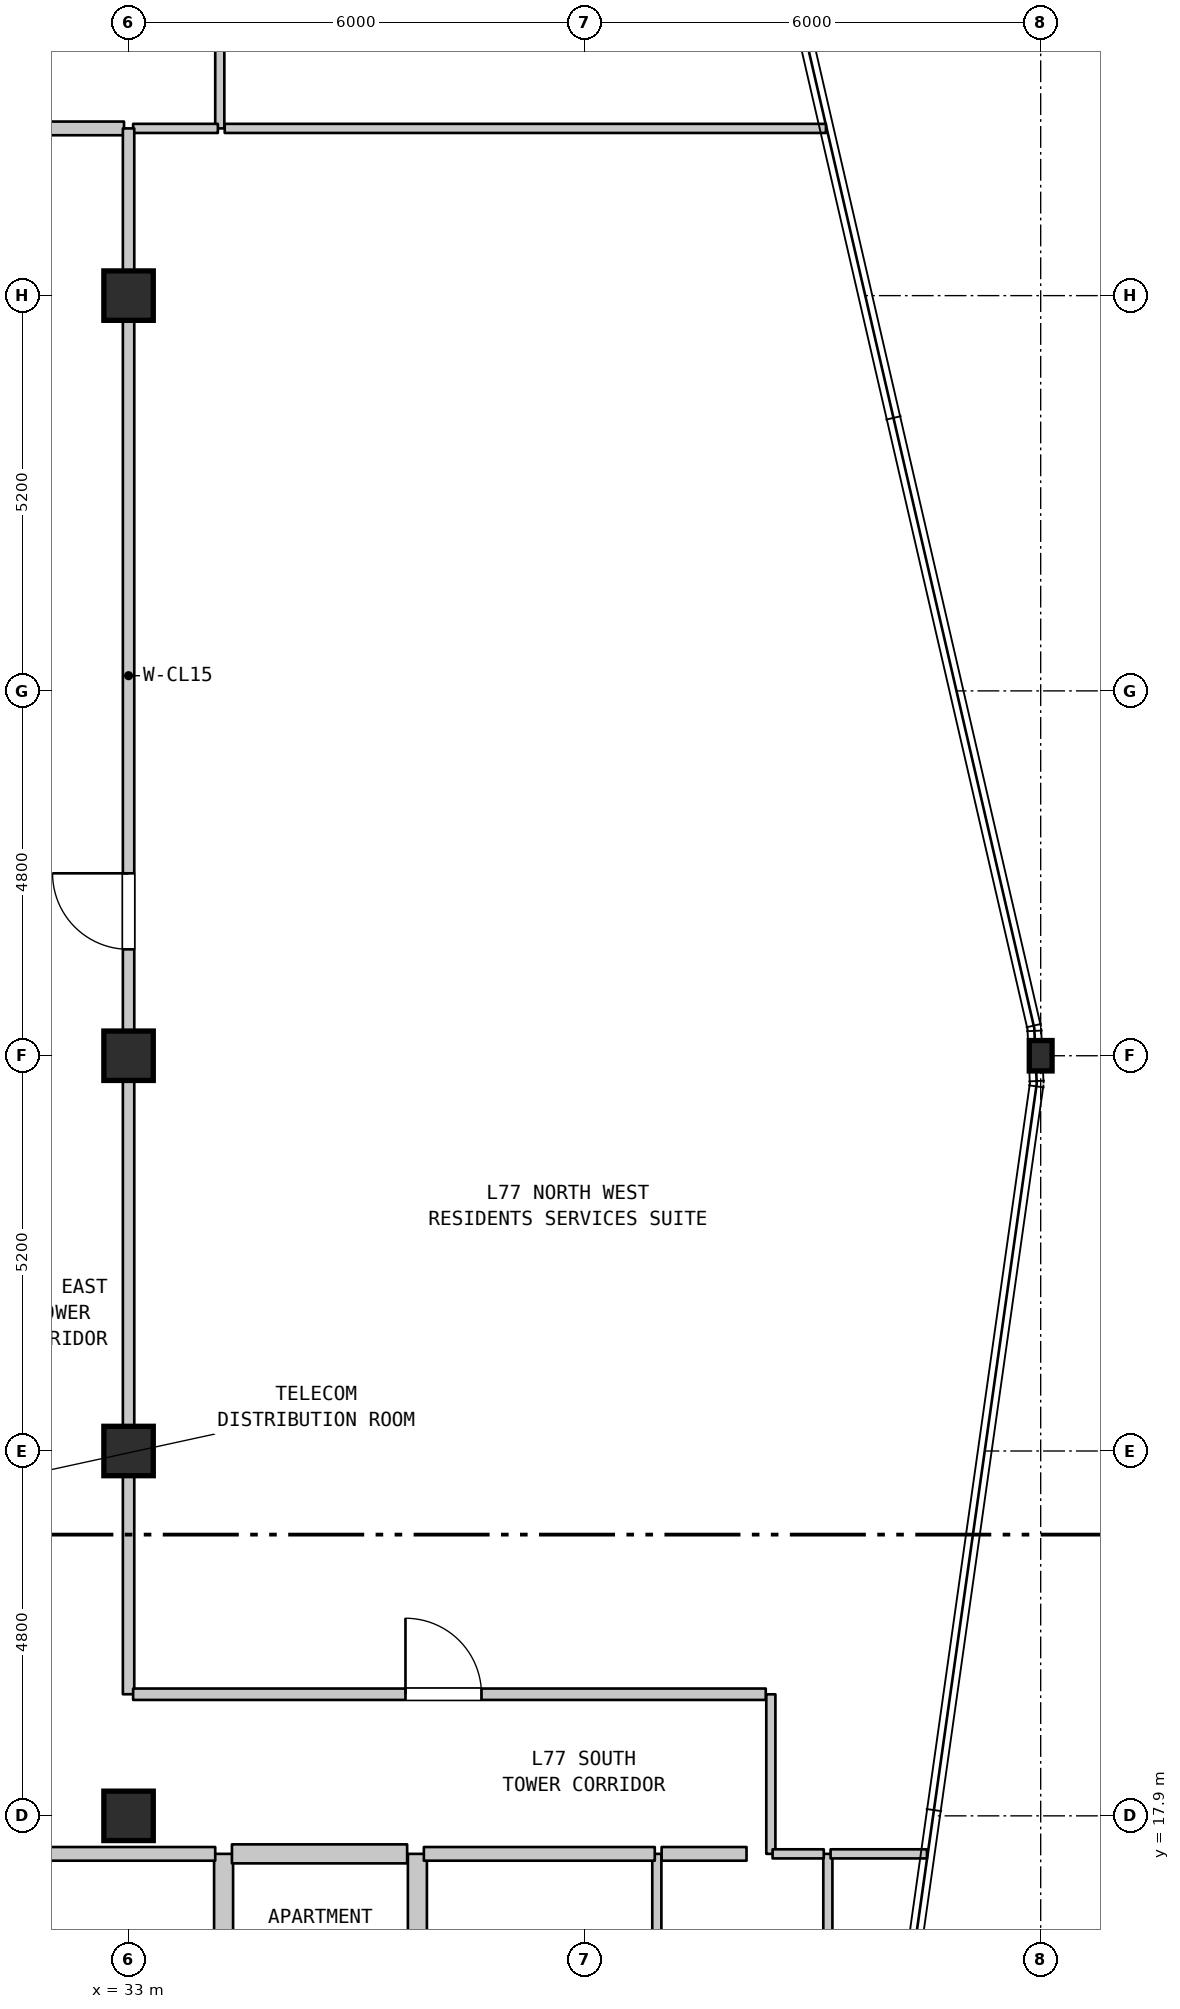
"""IFC4 building model, lengths in metres.
Left out: names, types, materials, properties, quantities, classifications, styles, units other than length and angle.
Written with IfcOpenShell. Run it as: python <this file> out.ifc"""

import sys

from ifc_helpers import new_model, si_unit, direction, frame, frame_2d, origin, origin_2d, place, context, subcontext, project, spatial, rectangle, i_section, extrude, element, fill, save


model = new_model("IFC4")
c1 = context("Model", 3, precision=1e-05, world=origin(), true_north=direction((0.0, 1.0)))
c2 = subcontext(c1, "Body", "Model", "MODEL_VIEW")
j1 = project(units=[si_unit("LENGTHUNIT", "METRE"), si_unit("PLANEANGLEUNIT", "RADIAN")], contexts=[c1])
p1 = place(None, origin())
s1 = spatial("IfcSite", under=j1, at=p1, CompositionType="ELEMENT")
p2 = place(p1, origin())
s2 = spatial("IfcBuilding", under=s1, at=p2, CompositionType="ELEMENT")
p3 = place(p2, frame((0.0, 0.0, 307.3)))
s3 = spatial("IfcBuildingStorey", under=s2, at=p3, CompositionType="ELEMENT", Elevation=307.3)
for number, where, z_axis, x_axis in (
    (1, (33.0, 17.9, 0.0), (0.0, 0.0, 1.0), (1.0, 0.0, 0.0)),
    (2, (33.0, 22.7, 0.0), (0.0, 0.0, 1.0), (1.0, 0.0, 0.0)),
    (3, (33.0, 27.9, 0.0), (0.0, 0.0, 1.0), (1.0, 0.0, 0.0)),
    (4, (33.0, 37.9, 0.0), (0.0, 0.0, 1.0), (1.0, 0.0, 0.0)),
):
    element("IfcColumn", number, at=place(p3, frame(where, z_axis=z_axis, x_axis=x_axis)), inside=s3, PredefinedType="COLUMN", context=c2, shape_type="SweptSolid", body=[
        extrude(rectangle(XDim=0.65, YDim=0.65, at=origin_2d()), origin(), (0.0, 0.0, 1.0), 3.7),
    ])
p4 = place(p3, frame((45.0, 27.9, 0.0), z_axis=(0.0, 0.0, 1.0), x_axis=(1.0, 0.0, 0.0)))
e5 = element("IfcColumn", 5, at=p4, inside=s3, PredefinedType="COLUMN", context=c2, shape_type="SweptSolid", body=[
    extrude(i_section(OverallWidth=0.3, OverallDepth=0.4, WebThickness=0.013, FlangeThickness=0.024, FilletRadius=0.027, at=origin_2d()), origin(), (0.0, 0.0, 1.0), 3.7),
])
p5 = place(p3, frame((33.0, 19.5, 0.0), z_axis=(0.0, 0.0, 1.0), x_axis=(0.0, 1.0, 0.0)))
e6 = element("IfcWall", 6, at=p5, inside=s3, PredefinedType="STANDARD", context=c2, shape_type="SweptSolid", body=[
    extrude(rectangle(XDim=8.4, YDim=0.15, at=frame_2d((4.2, 0.0))), origin(), (0.0, 0.0, 1.0), 3.1),
])
p6 = place(p3, frame((34.2, 40.1, 0.0), z_axis=(0.0, 0.0, 1.0), x_axis=(0.0, 1.0, 0.0)))
e7 = element("IfcWall", 7, at=p6, inside=s3, PredefinedType="PARTITIONING", context=c2, shape_type="SweptSolid", body=[
    extrude(rectangle(XDim=13.79, YDim=0.12, at=frame_2d((6.895, 0.0))), origin(), (0.0, 0.0, 1.0), 3.39),
])
p7 = place(p6, frame((1.852, 0.0, 0.0)))
e8 = element("IfcOpeningElement", 8, at=p7, cuts=e7, PredefinedType="OPENING", context=c2, shape_type="SweptSolid", body=[
    extrude(rectangle(XDim=0.9, YDim=2.15, at=frame_2d((0.45, 1.075))), frame((0.0, 0.07, 0.0), z_axis=(0.0, -1.0, 0.0), x_axis=(1.0, 0.0, 0.0)), (0.0, 0.0, 1.0), 0.14),
])
p8 = place(p6, frame((6.45, 0.0, 0.0)))
e9 = element("IfcOpeningElement", 9, at=p8, cuts=e7, PredefinedType="OPENING", context=c2, shape_type="SweptSolid", body=[
    extrude(rectangle(XDim=0.9, YDim=2.15, at=frame_2d((0.45, 1.075))), frame((0.0, 0.07, 0.0), z_axis=(0.0, -1.0, 0.0), x_axis=(1.0, 0.0, 0.0)), (0.0, 0.0, 1.0), 0.14),
])
p9 = place(p6, frame((10.898, 0.0, 0.0)))
e10 = element("IfcOpeningElement", 10, at=p9, cuts=e7, PredefinedType="OPENING", context=c2, shape_type="SweptSolid", body=[
    extrude(rectangle(XDim=0.9, YDim=2.15, at=frame_2d((0.45, 1.075))), frame((0.0, 0.07, 0.0), z_axis=(0.0, -1.0, 0.0), x_axis=(1.0, 0.0, 0.0)), (0.0, 0.0, 1.0), 0.14),
])
for number, where, z_axis, x_axis in (
    (11, (34.25, 13.62, 0.0), (0.0, 0.0, 1.0), (0.0, 1.0, 0.0)),
    (12, (36.8, 13.62, 0.0), (0.0, 0.0, 1.0), (0.0, 1.0, 0.0)),
):
    element("IfcWall", number, at=place(p3, frame(where, z_axis=z_axis, x_axis=x_axis)), inside=s3, PredefinedType="STANDARD", context=c2, shape_type="SweptSolid", body=[
        extrude(rectangle(XDim=3.78, YDim=0.25, at=frame_2d((1.89, 0.0))), origin(), (0.0, 0.0, 1.0), 3.39),
    ])
p10 = place(p3, frame((39.95, 13.62, 0.0), z_axis=(0.0, 0.0, 1.0), x_axis=(0.0, 1.0, 0.0)))
e13 = element("IfcWall", 13, at=p10, inside=s3, PredefinedType="PARTITIONING", context=c2, shape_type="SweptSolid", body=[
    extrude(rectangle(XDim=3.78, YDim=0.12, at=frame_2d((1.89, 0.0))), origin(), (0.0, 0.0, 1.0), 3.39),
])
p11 = place(p3, frame((41.45, 17.4, 0.0), z_axis=(0.0, 0.0, 1.0), x_axis=(0.0, 1.0, 0.0)))
e14 = element("IfcWall", 14, at=p11, inside=s3, PredefinedType="PARTITIONING", context=c2, shape_type="SweptSolid", body=[
    extrude(rectangle(XDim=2.099, YDim=0.12, at=frame_2d((1.05, 0.0))), origin(), (0.0, 0.0, 1.0), 3.39),
])
p12 = place(p3, frame((42.2, 13.62, 0.0), z_axis=(0.0, 0.0, 1.0), x_axis=(0.0, 1.0, 0.0)))
e15 = element("IfcWall", 15, at=p12, inside=s3, PredefinedType="PARTITIONING", context=c2, shape_type="SweptSolid", body=[
    extrude(rectangle(XDim=3.78, YDim=0.12, at=frame_2d((1.89, 0.0))), origin(), (0.0, 0.0, 1.0), 3.39),
])
p13 = place(p3, frame((29.045, 17.4, 0.0), z_axis=(0.0, 0.0, 1.0), x_axis=(1.0, 0.0, 0.0)))
e16 = element("IfcWall", 16, at=p13, inside=s3, PredefinedType="STANDARD", context=c2, shape_type="SweptSolid", body=[
    extrude(rectangle(XDim=5.095, YDim=0.18, at=frame_2d((2.547, 0.0))), origin(), (0.0, 0.0, 1.0), 3.39),
])
p14 = place(p13, frame((1.807, 0.0, 0.0)))
e17 = element("IfcOpeningElement", 17, at=p14, cuts=e16, PredefinedType="OPENING", context=c2, shape_type="SweptSolid", body=[
    extrude(rectangle(XDim=1.0, YDim=2.15, at=frame_2d((0.5, 1.075))), frame((0.0, 0.1, 0.0), z_axis=(0.0, -1.0, 0.0), x_axis=(1.0, 0.0, 0.0)), (0.0, 0.0, 1.0), 0.2),
])
p15 = place(p3, frame((34.36, 17.4, 0.0), z_axis=(0.0, 0.0, 1.0), x_axis=(1.0, 0.0, 0.0)))
e18 = element("IfcWall", 18, at=p15, inside=s3, PredefinedType="STANDARD", context=c2, shape_type="SweptSolid", body=[
    extrude(rectangle(XDim=2.305, YDim=0.25, at=frame_2d((1.152, 0.0))), origin(), (0.0, 0.0, 1.0), 3.39),
])
p16 = place(p3, frame((36.885, 17.4, 0.0), z_axis=(0.0, 0.0, 1.0), x_axis=(1.0, 0.0, 0.0)))
e19 = element("IfcWall", 19, at=p16, inside=s3, PredefinedType="STANDARD", context=c2, shape_type="SweptSolid", body=[
    extrude(rectangle(XDim=3.038, YDim=0.18, at=frame_2d((1.519, 0.0))), origin(), (0.0, 0.0, 1.0), 3.39),
])
p17 = place(p3, frame((40.013, 17.4, 0.0), z_axis=(0.0, 0.0, 1.0), x_axis=(1.0, 0.0, 0.0)))
e20 = element("IfcWall", 20, at=p17, inside=s3, PredefinedType="STANDARD", context=c2, shape_type="SweptSolid", body=[
    extrude(rectangle(XDim=1.117, YDim=0.18, at=frame_2d((0.559, 0.0))), origin(), (0.0, 0.0, 1.0), 3.39),
])
p18 = place(p3, frame((41.473, 17.4, 0.0), z_axis=(0.0, 0.0, 1.0), x_axis=(1.0, 0.0, 0.0)))
e21 = element("IfcWall", 21, at=p18, inside=s3, PredefinedType="PARTITIONING", context=c2, shape_type="SweptSolid", body=[
    extrude(rectangle(XDim=0.673, YDim=0.12, at=frame_2d((0.336, 0.0))), origin(), (0.0, 0.0, 1.0), 3.39),
])
p19 = place(p3, frame((42.236, 17.4, 0.0), z_axis=(0.0, 0.0, 1.0), x_axis=(1.0, 0.0, 0.0)))
e22 = element("IfcWall", 22, at=p19, inside=s3, PredefinedType="PARTITIONING", context=c2, shape_type="SweptSolid", body=[
    extrude(rectangle(XDim=1.268, YDim=0.12, at=frame_2d((0.634, 0.0))), origin(), (0.0, 0.0, 1.0), 3.39),
])
p20 = place(p3, frame((33.06, 19.5, 0.0), z_axis=(0.0, 0.0, 1.0), x_axis=(1.0, 0.0, 0.0)))
e23 = element("IfcWall", 23, at=p20, inside=s3, PredefinedType="STANDARD", context=c2, shape_type="SweptSolid", body=[
    extrude(rectangle(XDim=8.323, YDim=0.15, at=frame_2d((4.162, 0.0))), origin(), (0.0, 0.0, 1.0), 3.39),
])
p21 = place(p20, frame((3.583, 0.0, 0.0)))
e24 = element("IfcOpeningElement", 24, at=p21, cuts=e23, PredefinedType="OPENING", context=c2, shape_type="SweptSolid", body=[
    extrude(rectangle(XDim=1.0, YDim=2.15, at=frame_2d((0.5, 1.075))), frame((0.0, 0.085, 0.0), z_axis=(0.0, -1.0, 0.0), x_axis=(1.0, 0.0, 0.0)), (0.0, 0.0, 1.0), 0.17),
])
p22 = place(p3, frame((29.195, 40.1, 0.0), z_axis=(0.0, 0.0, 1.0), x_axis=(1.0, 0.0, 0.0)))
e25 = element("IfcWall", 25, at=p22, inside=s3, PredefinedType="STANDARD", context=c2, shape_type="SweptSolid", body=[
    extrude(rectangle(XDim=3.745, YDim=0.18, at=frame_2d((1.873, 0.0))), origin(), (0.0, 0.0, 1.0), 3.39),
])
p23 = place(p3, frame((33.06, 40.1, 0.0), z_axis=(0.0, 0.0, 1.0), x_axis=(1.0, 0.0, 0.0)))
e26 = element("IfcWall", 26, at=p23, inside=s3, PredefinedType="PARTITIONING", context=c2, shape_type="SweptSolid", body=[
    extrude(rectangle(XDim=1.115, YDim=0.12, at=frame_2d((0.558, 0.0))), origin(), (0.0, 0.0, 1.0), 3.39),
])
p24 = place(p3, frame((34.265, 40.1, 0.0), z_axis=(0.0, 0.0, 1.0), x_axis=(1.0, 0.0, 0.0)))
e27 = element("IfcWall", 27, at=p24, inside=s3, PredefinedType="PARTITIONING", context=c2, shape_type="SweptSolid", body=[
    extrude(rectangle(XDim=7.91, YDim=0.12, at=frame_2d((3.955, 0.0))), origin(), (0.0, 0.0, 1.0), 3.39),
])
p25 = place(p3, frame((33.0, 27.9, 0.0), z_axis=(0.0, 0.0, 1.0), x_axis=(0.0, 1.0, 0.0)))
e28 = element("IfcWall", 28, at=p25, inside=s3, PredefinedType="STANDARD", context=c2, shape_type="SweptSolid", body=[
    extrude(rectangle(XDim=10.0, YDim=0.15, at=frame_2d((5.0, 0.0))), origin(), (0.0, 0.0, 1.0), 2.89),
])
p26 = place(p25, frame((1.4, 0.0, 0.0)))
e29 = element("IfcOpeningElement", 29, at=p26, cuts=e28, PredefinedType="OPENING", context=c2, shape_type="SweptSolid", body=[
    extrude(rectangle(XDim=1.0, YDim=2.15, at=frame_2d((0.5, 1.075))), frame((0.0, 0.085, 0.0), z_axis=(0.0, -1.0, 0.0), x_axis=(1.0, 0.0, 0.0)), (0.0, 0.0, 1.0), 0.17),
])
p27 = place(p3, frame((33.0, 37.9, 0.0), z_axis=(0.0, 0.0, 1.0), x_axis=(0.0, 1.0, 0.0)))
e30 = element("IfcWall", 30, at=p27, inside=s3, PredefinedType="STANDARD", context=c2, shape_type="SweptSolid", body=[
    extrude(rectangle(XDim=2.2, YDim=0.15, at=frame_2d((1.1, 0.0))), origin(), (0.0, 0.0, 1.0), 2.79),
])
p28 = place(p26, origin())
e31 = element("IfcDoor", 31, at=p28, inside=s3, OperationType="SINGLE_SWING_RIGHT", PredefinedType="DOOR", context=c2, shape_type="SweptSolid", body=[
    extrude(rectangle(XDim=1.0, YDim=2.15, at=frame_2d((0.5, 1.075))), frame((0.0, 0.025, 0.0), z_axis=(0.0, -1.0, 0.0), x_axis=(1.0, 0.0, 0.0)), (0.0, 0.0, 1.0), 0.05),
])
fill(e29, e31)
p29 = place(p21, origin())
e32 = element("IfcDoor", 32, at=p29, inside=s3, OperationType="SINGLE_SWING_LEFT", PredefinedType="DOOR", context=c2, shape_type="SweptSolid", body=[
    extrude(rectangle(XDim=1.0, YDim=2.15, at=frame_2d((0.5, 1.075))), frame((0.0, 0.025, 0.0), z_axis=(0.0, -1.0, 0.0), x_axis=(1.0, 0.0, 0.0)), (0.0, 0.0, 1.0), 0.05),
])
fill(e24, e32)
save(model, sys.argv[1])
